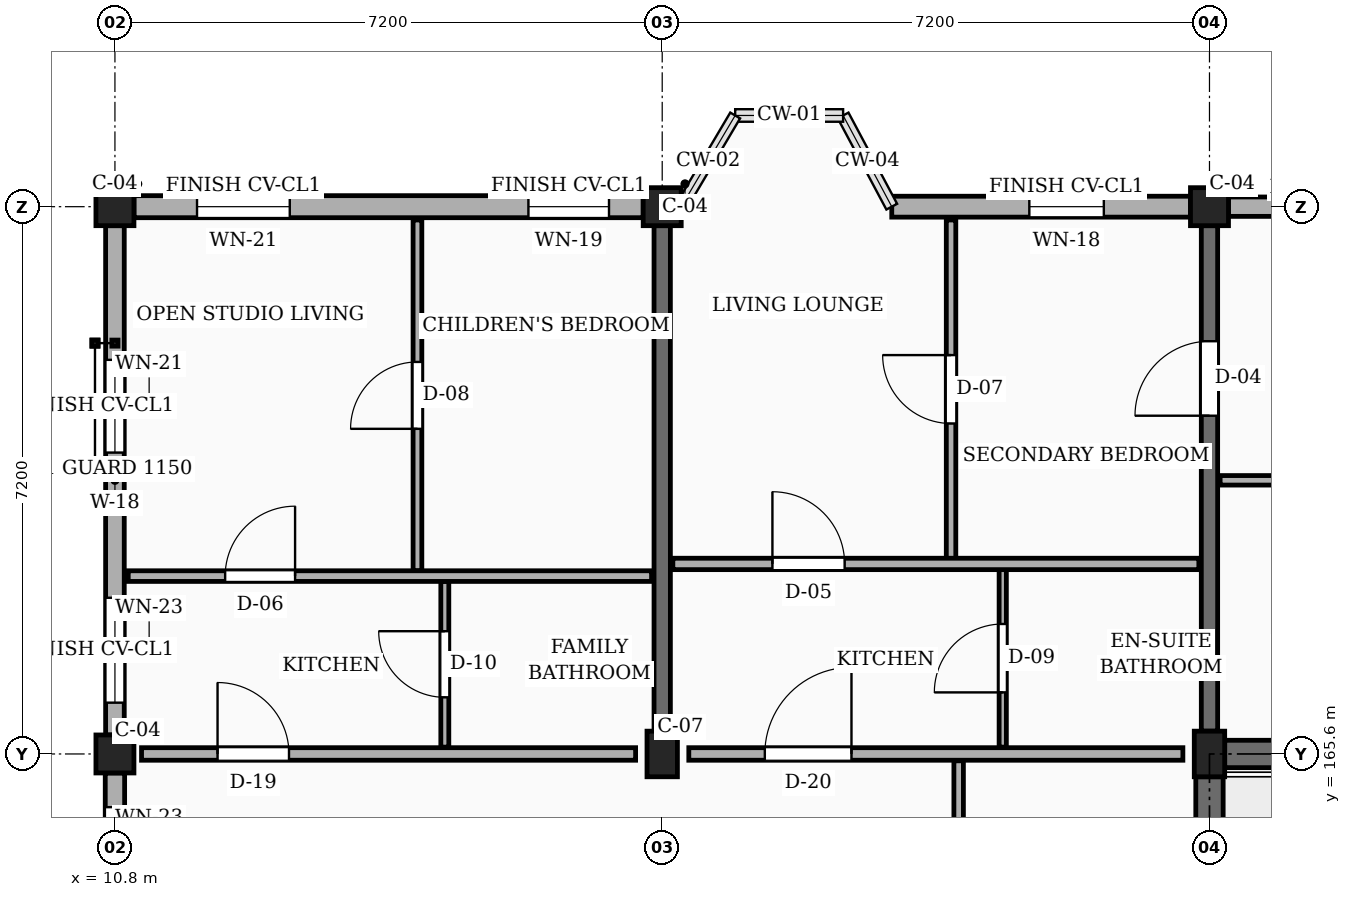
"""IFC4 building model, lengths in metres.
Left out: names, types, materials, properties, quantities, classifications, styles, units other than length and angle.
Written with IfcOpenShell. Run it as: python <this file> out.ifc"""

import sys

from ifc_helpers import new_model, si_unit, direction, frame, frame_2d, origin, origin_2d, place, context, subcontext, project, spatial, rectangle, extrude, element, fill, save


model = new_model("IFC4")
c1 = context("Model", 3, precision=1e-05, world=origin(), true_north=direction((0.0, 1.0)))
c2 = subcontext(c1, "Body", "Model", "MODEL_VIEW")
j1 = project(units=[si_unit("LENGTHUNIT", "METRE"), si_unit("PLANEANGLEUNIT", "RADIAN")], contexts=[c1])
p1 = place(None, origin())
s1 = spatial("IfcSite", under=j1, at=p1, CompositionType="ELEMENT")
p2 = place(p1, origin())
s2 = spatial("IfcBuilding", under=s1, at=p2, CompositionType="ELEMENT")
p3 = place(p2, frame((0.0, 0.0, 32.85)))
s3 = spatial("IfcBuildingStorey", under=s2, at=p3, CompositionType="ELEMENT", Elevation=32.85)
for number, where, z_axis, x_axis in (
    (1, (10.8, 165.6, 0.0), (0.0, 0.0, 1.0), (1.0, 0.0, 0.0)),
    (2, (10.8, 172.8, 0.0), (0.0, 0.0, 1.0), (1.0, 0.0, 0.0)),
):
    element("IfcColumn", number, at=place(p3, frame(where, z_axis=z_axis, x_axis=x_axis)), inside=s3, PredefinedType="COLUMN", context=c2, shape_type="SweptSolid", body=[
        extrude(rectangle(XDim=0.5, YDim=0.5, at=origin_2d()), origin(), (0.0, 0.0, 1.0), 3.15),
    ])
p4 = place(p3, frame((18.0, 165.6, 0.0), z_axis=(0.0, 0.0, 1.0), x_axis=(1.0, 0.0, 0.0)))
e3 = element("IfcColumn", 3, at=p4, inside=s3, PredefinedType="COLUMN", context=c2, shape_type="SweptSolid", body=[
    extrude(rectangle(XDim=0.4, YDim=0.6, at=origin_2d()), origin(), (0.0, 0.0, 1.0), 3.15),
])
p5 = place(p3, frame((18.0, 172.8, 0.0), z_axis=(0.0, 0.0, 1.0), x_axis=(1.0, 0.0, 0.0)))
e4 = element("IfcColumn", 4, at=p5, inside=s3, PredefinedType="COLUMN", context=c2, shape_type="SweptSolid", body=[
    extrude(rectangle(XDim=0.5, YDim=0.5, at=origin_2d()), origin(), (0.0, 0.0, 1.0), 3.15),
])
p6 = place(p3, frame((25.2, 165.6, 0.0), z_axis=(0.0, 0.0, 1.0), x_axis=(1.0, 0.0, 0.0)))
e5 = element("IfcColumn", 5, at=p6, inside=s3, PredefinedType="COLUMN", context=c2, shape_type="SweptSolid", body=[
    extrude(rectangle(XDim=0.4, YDim=0.6, at=origin_2d()), origin(), (0.0, 0.0, 1.0), 3.15),
])
p7 = place(p3, frame((25.2, 172.8, 0.0), z_axis=(0.0, 0.0, 1.0), x_axis=(1.0, 0.0, 0.0)))
e6 = element("IfcColumn", 6, at=p7, inside=s3, PredefinedType="COLUMN", context=c2, shape_type="SweptSolid", body=[
    extrude(rectangle(XDim=0.5, YDim=0.5, at=origin_2d()), origin(), (0.0, 0.0, 1.0), 3.15),
])
p8 = place(p3, frame((18.0, 165.9, 0.0), z_axis=(0.0, 0.0, 1.0), x_axis=(0.0, 1.0, 0.0)))
e7 = element("IfcWall", 7, at=p8, inside=s3, PredefinedType="SOLIDWALL", context=c2, shape_type="SweptSolid", body=[
    extrude(rectangle(XDim=6.65, YDim=0.215, at=frame_2d((3.325, 0.0))), origin(), (0.0, 0.0, 1.0), 2.185),
])
p9 = place(p3, frame((25.2, 165.9, 0.0), z_axis=(0.0, 0.0, 1.0), x_axis=(0.0, 1.0, 0.0)))
e8 = element("IfcWall", 8, at=p9, inside=s3, PredefinedType="SOLIDWALL", context=c2, shape_type="SweptSolid", body=[
    extrude(rectangle(XDim=6.65, YDim=0.215, at=frame_2d((3.325, 0.0))), origin(), (0.0, 0.0, 1.0), 2.185),
])
p10 = place(p9, frame((4.15, 0.0, 0.0)))
e9 = element("IfcOpeningElement", 9, at=p10, cuts=e8, PredefinedType="OPENING", context=c2, shape_type="SweptSolid", body=[
    extrude(rectangle(XDim=0.98, YDim=2.12, at=frame_2d((0.49, 1.06))), frame((0.0, 0.118, 0.0), z_axis=(0.0, -1.0, 0.0), x_axis=(1.0, 0.0, 0.0)), (0.0, 0.0, 1.0), 0.235),
])
p11 = place(p3, frame((32.15, 172.8, 0.0), z_axis=(0.0, 0.0, 1.0), x_axis=(-1.0, 0.0, 0.0)))
e10 = element("IfcWall", 10, at=p11, inside=s3, PredefinedType="SOLIDWALL", context=c2, shape_type="SweptSolid", body=[
    extrude(rectangle(XDim=6.7, YDim=0.255, at=frame_2d((3.35, 0.0))), origin(), (0.0, 0.0, 1.0), 2.455),
])
p12 = place(p11, frame((0.45, 0.0, 0.78)))
e11 = element("IfcOpeningElement", 11, at=p12, cuts=e10, PredefinedType="OPENING", context=c2, shape_type="SweptSolid", body=[
    extrude(rectangle(XDim=1.44, YDim=1.26, at=frame_2d((0.72, 0.63))), frame((0.0, 0.137, 0.0), z_axis=(0.0, -1.0, 0.0), x_axis=(1.0, 0.0, 0.0)), (0.0, 0.0, 1.0), 0.275),
])
p13 = place(p11, frame((4.65, 0.0, 0.78)))
e12 = element("IfcOpeningElement", 12, at=p13, cuts=e10, PredefinedType="OPENING", context=c2, shape_type="SweptSolid", body=[
    extrude(rectangle(XDim=0.98, YDim=1.36, at=frame_2d((0.49, 0.68))), frame((0.0, 0.137, 0.0), z_axis=(0.0, -1.0, 0.0), x_axis=(1.0, 0.0, 0.0)), (0.0, 0.0, 1.0), 0.275),
])
p14 = place(p3, frame((24.95, 172.8, 0.0), z_axis=(0.0, 0.0, 1.0), x_axis=(-1.0, 0.0, 0.0)))
e13 = element("IfcWall", 13, at=p14, inside=s3, PredefinedType="SOLIDWALL", context=c2, shape_type="SweptSolid", body=[
    extrude(rectangle(XDim=3.93, YDim=0.275, at=frame_2d((1.965, 0.0))), origin(), (0.0, 0.0, 1.0), 2.455),
])
p15 = place(p14, frame((1.14, 0.0, 0.78)))
e14 = element("IfcOpeningElement", 14, at=p15, cuts=e13, PredefinedType="OPENING", context=c2, shape_type="SweptSolid", body=[
    extrude(rectangle(XDim=0.98, YDim=1.36, at=frame_2d((0.49, 0.68))), frame((0.0, 0.147, 0.0), z_axis=(0.0, -1.0, 0.0), x_axis=(1.0, 0.0, 0.0)), (0.0, 0.0, 1.0), 0.295),
])
p16 = place(p3, frame((17.75, 172.8, 0.0), z_axis=(0.0, 0.0, 1.0), x_axis=(-1.0, 0.0, 0.0)))
e15 = element("IfcWall", 15, at=p16, inside=s3, PredefinedType="SOLIDWALL", context=c2, shape_type="SweptSolid", body=[
    extrude(rectangle(XDim=6.7, YDim=0.29, at=frame_2d((3.35, 0.0))), origin(), (0.0, 0.0, 1.0), 2.455),
])
p17 = place(p16, frame((0.45, 0.0, 0.78)))
e16 = element("IfcOpeningElement", 16, at=p17, cuts=e15, PredefinedType="OPENING", context=c2, shape_type="SweptSolid", body=[
    extrude(rectangle(XDim=1.06, YDim=1.36, at=frame_2d((0.53, 0.68))), frame((0.0, 0.155, 0.0), z_axis=(0.0, -1.0, 0.0), x_axis=(1.0, 0.0, 0.0)), (0.0, 0.0, 1.0), 0.31),
])
p18 = place(p16, frame((4.65, 0.0, 0.78)))
e17 = element("IfcOpeningElement", 17, at=p18, cuts=e15, PredefinedType="OPENING", context=c2, shape_type="SweptSolid", body=[
    extrude(rectangle(XDim=1.22, YDim=1.36, at=frame_2d((0.61, 0.68))), frame((0.0, 0.155, 0.0), z_axis=(0.0, -1.0, 0.0), x_axis=(1.0, 0.0, 0.0)), (0.0, 0.0, 1.0), 0.31),
])
p19 = place(p3, frame((10.8, 172.55, 0.0), z_axis=(0.0, 0.0, 1.0), x_axis=(0.0, -1.0, 0.0)))
e18 = element("IfcWall", 18, at=p19, inside=s3, PredefinedType="SOLIDWALL", context=c2, shape_type="SweptSolid", body=[
    extrude(rectangle(XDim=6.7, YDim=0.245, at=frame_2d((3.35, 0.0))), origin(), (0.0, 0.0, 1.0), 2.455),
])
p20 = place(p19, frame((1.765, 0.0, 0.78)))
e19 = element("IfcOpeningElement", 19, at=p20, cuts=e18, PredefinedType="OPENING", context=c2, shape_type="SweptSolid", body=[
    extrude(rectangle(XDim=1.22, YDim=1.36, at=frame_2d((0.61, 0.68))), frame((0.0, 0.133, 0.0), z_axis=(0.0, -1.0, 0.0), x_axis=(1.0, 0.0, 0.0)), (0.0, 0.0, 1.0), 0.265),
])
p21 = place(p19, frame((4.895, 0.0, 0.78)))
e20 = element("IfcOpeningElement", 20, at=p21, cuts=e18, PredefinedType="OPENING", context=c2, shape_type="SweptSolid", body=[
    extrude(rectangle(XDim=1.38, YDim=1.36, at=frame_2d((0.69, 0.68))), frame((0.0, 0.133, 0.0), z_axis=(0.0, -1.0, 0.0), x_axis=(1.0, 0.0, 0.0)), (0.0, 0.0, 1.0), 0.265),
])
p22 = place(p3, frame((10.8, 165.35, 0.0), z_axis=(0.0, 0.0, 1.0), x_axis=(0.0, -1.0, 0.0)))
e21 = element("IfcWall", 21, at=p22, inside=s3, PredefinedType="SOLIDWALL", context=c2, shape_type="SweptSolid", body=[
    extrude(rectangle(XDim=6.7, YDim=0.255, at=frame_2d((3.35, 0.0))), origin(), (0.0, 0.0, 1.0), 2.455),
])
p23 = place(p22, frame((0.45, 0.0, 0.78)))
e22 = element("IfcOpeningElement", 22, at=p23, cuts=e21, PredefinedType="OPENING", context=c2, shape_type="SweptSolid", body=[
    extrude(rectangle(XDim=1.38, YDim=1.36, at=frame_2d((0.69, 0.68))), frame((0.0, 0.137, 0.0), z_axis=(0.0, -1.0, 0.0), x_axis=(1.0, 0.0, 0.0)), (0.0, 0.0, 1.0), 0.275),
])
p24 = place(p22, frame((4.65, 0.0, 0.78)))
e23 = element("IfcOpeningElement", 23, at=p24, cuts=e21, PredefinedType="OPENING", context=c2, shape_type="SweptSolid", body=[
    extrude(rectangle(XDim=0.94, YDim=1.44, at=frame_2d((0.47, 0.72))), frame((0.0, 0.137, 0.0), z_axis=(0.0, -1.0, 0.0), x_axis=(1.0, 0.0, 0.0)), (0.0, 0.0, 1.0), 0.275),
])
p25 = place(p3, frame((25.2, 158.7, 0.0), z_axis=(0.0, 0.0, 1.0), x_axis=(0.0, 1.0, 0.0)))
e24 = element("IfcWall", 24, at=p25, inside=s3, PredefinedType="SHEAR", context=c2, shape_type="SweptSolid", body=[
    extrude(rectangle(XDim=6.6, YDim=0.36, at=frame_2d((3.3, 0.0))), origin(), (0.0, 0.0, 1.0), 2.885),
])
p26 = place(p3, frame((25.4, 165.6, 0.0), z_axis=(0.0, 0.0, 1.0), x_axis=(1.0, 0.0, 0.0)))
e25 = element("IfcWall", 25, at=p26, inside=s3, PredefinedType="SHEAR", context=c2, shape_type="SweptSolid", body=[
    extrude(rectangle(XDim=6.8, YDim=0.36, at=frame_2d((3.4, 0.0))), origin(), (0.0, 0.0, 1.0), 2.885),
])
p27 = place(p3, frame((11.15, 165.6, 0.0), z_axis=(0.0, 0.0, 1.0), x_axis=(1.0, 0.0, 0.0)))
e26 = element("IfcWall", 26, at=p27, inside=s3, PredefinedType="PARTITIONING", context=c2, shape_type="SweptSolid", body=[
    extrude(rectangle(XDim=6.5, YDim=0.165, at=frame_2d((3.25, 0.0))), origin(), (0.0, 0.0, 1.0), 2.32),
])
p28 = place(p27, frame((1.0, 0.0, 0.0)))
e27 = element("IfcOpeningElement", 27, at=p28, cuts=e26, PredefinedType="OPENING", context=c2, shape_type="SweptSolid", body=[
    extrude(rectangle(XDim=0.94, YDim=2.12, at=frame_2d((0.47, 1.06))), frame((0.0, 0.093, 0.0), z_axis=(0.0, -1.0, 0.0), x_axis=(1.0, 0.0, 0.0)), (0.0, 0.0, 1.0), 0.185),
])
p29 = place(p3, frame((18.35, 165.6, 0.0), z_axis=(0.0, 0.0, 1.0), x_axis=(1.0, 0.0, 0.0)))
e28 = element("IfcWall", 28, at=p29, inside=s3, PredefinedType="PARTITIONING", context=c2, shape_type="SweptSolid", body=[
    extrude(rectangle(XDim=6.5, YDim=0.165, at=frame_2d((3.25, 0.0))), origin(), (0.0, 0.0, 1.0), 2.32),
])
p30 = place(p29, frame((1.0, 0.0, 0.0)))
e29 = element("IfcOpeningElement", 29, at=p30, cuts=e28, PredefinedType="OPENING", context=c2, shape_type="SweptSolid", body=[
    extrude(rectangle(XDim=1.14, YDim=2.18, at=frame_2d((0.57, 1.09))), frame((0.0, 0.093, 0.0), z_axis=(0.0, -1.0, 0.0), x_axis=(1.0, 0.0, 0.0)), (0.0, 0.0, 1.0), 0.185),
])
p31 = place(p3, frame((14.78, 168.01, 0.0), z_axis=(0.0, 0.0, 1.0), x_axis=(0.0, 1.0, 0.0)))
e30 = element("IfcWall", 30, at=p31, inside=s3, PredefinedType="PARTITIONING", context=c2, shape_type="SweptSolid", body=[
    extrude(rectangle(XDim=4.615, YDim=0.115, at=frame_2d((2.308, 0.0))), origin(), (0.0, 0.0, 1.0), 2.32),
])
p32 = place(p31, frame((1.867, 0.0, 0.0)))
e31 = element("IfcOpeningElement", 31, at=p32, cuts=e30, PredefinedType="OPENING", context=c2, shape_type="SweptSolid", body=[
    extrude(rectangle(XDim=0.88, YDim=2.08, at=frame_2d((0.44, 1.04))), frame((0.0, 0.067, 0.0), z_axis=(0.0, -1.0, 0.0), x_axis=(1.0, 0.0, 0.0)), (0.0, 0.0, 1.0), 0.135),
])
p33 = place(p3, frame((15.14, 165.69, 0.0), z_axis=(0.0, 0.0, 1.0), x_axis=(0.0, 1.0, 0.0)))
e32 = element("IfcWall", 32, at=p33, inside=s3, PredefinedType="PARTITIONING", context=c2, shape_type="SweptSolid", body=[
    extrude(rectangle(XDim=2.18, YDim=0.105, at=frame_2d((1.09, 0.0))), origin(), (0.0, 0.0, 1.0), 2.32),
])
p34 = place(p33, frame((0.655, 0.0, 0.0)))
e33 = element("IfcOpeningElement", 33, at=p34, cuts=e32, PredefinedType="OPENING", context=c2, shape_type="SweptSolid", body=[
    extrude(rectangle(XDim=0.87, YDim=2.05, at=frame_2d((0.435, 1.025))), frame((0.0, 0.062, 0.0), z_axis=(0.0, -1.0, 0.0), x_axis=(1.0, 0.0, 0.0)), (0.0, 0.0, 1.0), 0.125),
])
p35 = place(p3, frame((10.975, 167.94, 0.0), z_axis=(0.0, 0.0, 1.0), x_axis=(1.0, 0.0, 0.0)))
e34 = element("IfcWall", 34, at=p35, inside=s3, PredefinedType="PARTITIONING", context=c2, shape_type="SweptSolid", body=[
    extrude(rectangle(XDim=6.885, YDim=0.14, at=frame_2d((3.442, 0.0))), origin(), (0.0, 0.0, 1.0), 2.32),
])
p36 = place(p35, frame((1.275, 0.0, 0.0)))
e35 = element("IfcOpeningElement", 35, at=p36, cuts=e34, PredefinedType="OPENING", context=c2, shape_type="SweptSolid", body=[
    extrude(rectangle(XDim=0.92, YDim=2.1, at=frame_2d((0.46, 1.05))), frame((0.0, 0.08, 0.0), z_axis=(0.0, -1.0, 0.0), x_axis=(1.0, 0.0, 0.0)), (0.0, 0.0, 1.0), 0.16),
])
p37 = place(p3, frame((21.9, 158.49, 0.0), z_axis=(0.0, 0.0, 1.0), x_axis=(0.0, 1.0, 0.0)))
e36 = element("IfcWall", 36, at=p37, inside=s3, PredefinedType="PARTITIONING", context=c2, shape_type="SweptSolid", body=[
    extrude(rectangle(XDim=7.02, YDim=0.125, at=frame_2d((3.51, 0.0))), origin(), (0.0, 0.0, 1.0), 2.32),
])
p38 = place(p37, frame((2.85, 0.0, 0.0)))
e37 = element("IfcOpeningElement", 37, at=p38, cuts=e36, PredefinedType="OPENING", context=c2, shape_type="SweptSolid", body=[
    extrude(rectangle(XDim=1.02, YDim=2.15, at=frame_2d((0.51, 1.075))), frame((0.0, 0.073, 0.0), z_axis=(0.0, -1.0, 0.0), x_axis=(1.0, 0.0, 0.0)), (0.0, 0.0, 1.0), 0.145),
])
p39 = place(p3, frame((21.8, 168.17, 0.0), z_axis=(0.0, 0.0, 1.0), x_axis=(0.0, 1.0, 0.0)))
e38 = element("IfcWall", 38, at=p39, inside=s3, PredefinedType="PARTITIONING", context=c2, shape_type="SweptSolid", body=[
    extrude(rectangle(XDim=4.455, YDim=0.125, at=frame_2d((2.228, 0.0))), origin(), (0.0, 0.0, 1.0), 2.32),
])
p40 = place(p39, frame((1.778, 0.0, 0.0)))
e39 = element("IfcOpeningElement", 39, at=p40, cuts=e38, PredefinedType="OPENING", context=c2, shape_type="SweptSolid", body=[
    extrude(rectangle(XDim=0.9, YDim=2.1, at=frame_2d((0.45, 1.05))), frame((0.0, 0.073, 0.0), z_axis=(0.0, -1.0, 0.0), x_axis=(1.0, 0.0, 0.0)), (0.0, 0.0, 1.0), 0.145),
])
p41 = place(p3, frame((22.48, 165.69, 0.0), z_axis=(0.0, 0.0, 1.0), x_axis=(0.0, 1.0, 0.0)))
e40 = element("IfcWall", 40, at=p41, inside=s3, PredefinedType="PARTITIONING", context=c2, shape_type="SweptSolid", body=[
    extrude(rectangle(XDim=2.34, YDim=0.095, at=frame_2d((1.17, 0.0))), origin(), (0.0, 0.0, 1.0), 2.32),
])
p42 = place(p41, frame((0.72, 0.0, 0.0)))
e41 = element("IfcOpeningElement", 41, at=p42, cuts=e40, PredefinedType="OPENING", context=c2, shape_type="SweptSolid", body=[
    extrude(rectangle(XDim=0.9, YDim=2.05, at=frame_2d((0.45, 1.025))), frame((0.0, 0.058, 0.0), z_axis=(0.0, -1.0, 0.0), x_axis=(1.0, 0.0, 0.0)), (0.0, 0.0, 1.0), 0.115),
])
p43 = place(p3, frame((18.14, 168.1, 0.0), z_axis=(0.0, 0.0, 1.0), x_axis=(1.0, 0.0, 0.0)))
e42 = element("IfcWall", 42, at=p43, inside=s3, PredefinedType="PARTITIONING", context=c2, shape_type="SweptSolid", body=[
    extrude(rectangle(XDim=6.92, YDim=0.15, at=frame_2d((3.46, 0.0))), origin(), (0.0, 0.0, 1.0), 2.32),
])
p44 = place(p43, frame((1.31, 0.0, 0.0)))
e43 = element("IfcOpeningElement", 43, at=p44, cuts=e42, PredefinedType="OPENING", context=c2, shape_type="SweptSolid", body=[
    extrude(rectangle(XDim=0.95, YDim=2.1, at=frame_2d((0.475, 1.05))), frame((0.0, 0.085, 0.0), z_axis=(0.0, -1.0, 0.0), x_axis=(1.0, 0.0, 0.0)), (0.0, 0.0, 1.0), 0.17),
])
p45 = place(p3, frame((25.34, 169.2, 0.0), z_axis=(0.0, 0.0, 1.0), x_axis=(1.0, 0.0, 0.0)))
e44 = element("IfcWall", 44, at=p45, inside=s3, PredefinedType="PARTITIONING", context=c2, shape_type="SweptSolid", body=[
    extrude(rectangle(XDim=6.92, YDim=0.125, at=frame_2d((3.46, 0.0))), origin(), (0.0, 0.0, 1.0), 2.32),
])
p46 = place(p45, frame((1.05, 0.0, 0.0)))
e45 = element("IfcOpeningElement", 45, at=p46, cuts=e44, PredefinedType="OPENING", context=c2, shape_type="SweptSolid", body=[
    extrude(rectangle(XDim=0.87, YDim=2.05, at=frame_2d((0.435, 1.025))), frame((0.0, 0.073, 0.0), z_axis=(0.0, -1.0, 0.0), x_axis=(1.0, 0.0, 0.0)), (0.0, 0.0, 1.0), 0.145),
])
p47 = place(p45, frame((4.45, 0.0, 0.0)))
e46 = element("IfcOpeningElement", 46, at=p47, cuts=e44, PredefinedType="OPENING", context=c2, shape_type="SweptSolid", body=[
    extrude(rectangle(XDim=0.88, YDim=2.08, at=frame_2d((0.44, 1.04))), frame((0.0, 0.073, 0.0), z_axis=(0.0, -1.0, 0.0), x_axis=(1.0, 0.0, 0.0)), (0.0, 0.0, 1.0), 0.145),
])
p48 = place(p15, origin())
e47 = element("IfcWindow", 47, at=p48, inside=s3, PartitioningType="SINGLE_PANEL", PredefinedType="WINDOW", context=c2, shape_type="SweptSolid", body=[
    extrude(rectangle(XDim=0.98, YDim=1.36, at=frame_2d((0.49, 0.68))), frame((0.0, 0.03, 0.0), z_axis=(0.0, -1.0, 0.0), x_axis=(1.0, 0.0, 0.0)), (0.0, 0.0, 1.0), 0.06),
])
fill(e14, e47)
p49 = place(p17, origin())
e48 = element("IfcWindow", 48, at=p49, inside=s3, PartitioningType="SINGLE_PANEL", PredefinedType="WINDOW", context=c2, shape_type="SweptSolid", body=[
    extrude(rectangle(XDim=1.06, YDim=1.36, at=frame_2d((0.53, 0.68))), frame((0.0, 0.03, 0.0), z_axis=(0.0, -1.0, 0.0), x_axis=(1.0, 0.0, 0.0)), (0.0, 0.0, 1.0), 0.06),
])
fill(e16, e48)
p50 = place(p18, origin())
e49 = element("IfcWindow", 49, at=p50, inside=s3, PartitioningType="SINGLE_PANEL", PredefinedType="WINDOW", context=c2, shape_type="SweptSolid", body=[
    extrude(rectangle(XDim=1.22, YDim=1.36, at=frame_2d((0.61, 0.68))), frame((0.0, 0.03, 0.0), z_axis=(0.0, -1.0, 0.0), x_axis=(1.0, 0.0, 0.0)), (0.0, 0.0, 1.0), 0.06),
])
fill(e17, e49)
p51 = place(p20, origin())
e50 = element("IfcWindow", 50, at=p51, inside=s3, PartitioningType="SINGLE_PANEL", PredefinedType="WINDOW", context=c2, shape_type="SweptSolid", body=[
    extrude(rectangle(XDim=1.22, YDim=1.36, at=frame_2d((0.61, 0.68))), frame((0.0, 0.03, 0.0), z_axis=(0.0, -1.0, 0.0), x_axis=(1.0, 0.0, 0.0)), (0.0, 0.0, 1.0), 0.06),
])
fill(e19, e50)
p52 = place(p21, origin())
e51 = element("IfcWindow", 51, at=p52, inside=s3, PartitioningType="SINGLE_PANEL", PredefinedType="WINDOW", context=c2, shape_type="SweptSolid", body=[
    extrude(rectangle(XDim=1.38, YDim=1.36, at=frame_2d((0.69, 0.68))), frame((0.0, 0.03, 0.0), z_axis=(0.0, -1.0, 0.0), x_axis=(1.0, 0.0, 0.0)), (0.0, 0.0, 1.0), 0.06),
])
fill(e20, e51)
p53 = place(p23, origin())
e52 = element("IfcWindow", 52, at=p53, inside=s3, PartitioningType="SINGLE_PANEL", PredefinedType="WINDOW", context=c2, shape_type="SweptSolid", body=[
    extrude(rectangle(XDim=1.38, YDim=1.36, at=frame_2d((0.69, 0.68))), frame((0.0, 0.03, 0.0), z_axis=(0.0, -1.0, 0.0), x_axis=(1.0, 0.0, 0.0)), (0.0, 0.0, 1.0), 0.06),
])
fill(e22, e52)
p54 = place(p28, origin())
e53 = element("IfcDoor", 53, at=p54, inside=s3, OperationType="SINGLE_SWING_LEFT", PredefinedType="DOOR", context=c2, shape_type="SweptSolid", body=[
    extrude(rectangle(XDim=0.94, YDim=2.12, at=frame_2d((0.47, 1.06))), frame((0.0, 0.025, 0.0), z_axis=(0.0, -1.0, 0.0), x_axis=(1.0, 0.0, 0.0)), (0.0, 0.0, 1.0), 0.05),
])
fill(e27, e53)
p55 = place(p30, origin())
e54 = element("IfcDoor", 54, at=p55, inside=s3, OperationType="SINGLE_SWING_RIGHT", PredefinedType="DOOR", context=c2, shape_type="SweptSolid", body=[
    extrude(rectangle(XDim=1.14, YDim=2.18, at=frame_2d((0.57, 1.09))), frame((0.0, 0.025, 0.0), z_axis=(0.0, -1.0, 0.0), x_axis=(1.0, 0.0, 0.0)), (0.0, 0.0, 1.0), 0.05),
])
fill(e29, e54)
p56 = place(p32, origin())
e55 = element("IfcDoor", 55, at=p56, inside=s3, OperationType="SINGLE_SWING_LEFT", PredefinedType="DOOR", context=c2, shape_type="SweptSolid", body=[
    extrude(rectangle(XDim=0.88, YDim=2.08, at=frame_2d((0.44, 1.04))), frame((0.0, 0.025, 0.0), z_axis=(0.0, -1.0, 0.0), x_axis=(1.0, 0.0, 0.0)), (0.0, 0.0, 1.0), 0.05),
])
fill(e31, e55)
p57 = place(p34, origin())
e56 = element("IfcDoor", 56, at=p57, inside=s3, OperationType="SINGLE_SWING_RIGHT", PredefinedType="DOOR", context=c2, shape_type="SweptSolid", body=[
    extrude(rectangle(XDim=0.87, YDim=2.05, at=frame_2d((0.435, 1.025))), frame((0.0, 0.025, 0.0), z_axis=(0.0, -1.0, 0.0), x_axis=(1.0, 0.0, 0.0)), (0.0, 0.0, 1.0), 0.05),
])
fill(e33, e56)
p58 = place(p36, origin())
e57 = element("IfcDoor", 57, at=p58, inside=s3, OperationType="SINGLE_SWING_RIGHT", PredefinedType="DOOR", context=c2, shape_type="SweptSolid", body=[
    extrude(rectangle(XDim=0.92, YDim=2.1, at=frame_2d((0.46, 1.05))), frame((0.0, 0.025, 0.0), z_axis=(0.0, -1.0, 0.0), x_axis=(1.0, 0.0, 0.0)), (0.0, 0.0, 1.0), 0.05),
])
fill(e35, e57)
p59 = place(p40, origin())
e58 = element("IfcDoor", 58, at=p59, inside=s3, OperationType="SINGLE_SWING_RIGHT", PredefinedType="DOOR", context=c2, shape_type="SweptSolid", body=[
    extrude(rectangle(XDim=0.9, YDim=2.1, at=frame_2d((0.45, 1.05))), frame((0.0, 0.025, 0.0), z_axis=(0.0, -1.0, 0.0), x_axis=(1.0, 0.0, 0.0)), (0.0, 0.0, 1.0), 0.05),
])
fill(e39, e58)
p60 = place(p42, origin())
e59 = element("IfcDoor", 59, at=p60, inside=s3, OperationType="SINGLE_SWING_LEFT", PredefinedType="DOOR", context=c2, shape_type="SweptSolid", body=[
    extrude(rectangle(XDim=0.9, YDim=2.05, at=frame_2d((0.45, 1.025))), frame((0.0, 0.025, 0.0), z_axis=(0.0, -1.0, 0.0), x_axis=(1.0, 0.0, 0.0)), (0.0, 0.0, 1.0), 0.05),
])
fill(e41, e59)
p61 = place(p44, origin())
e60 = element("IfcDoor", 60, at=p61, inside=s3, OperationType="SINGLE_SWING_LEFT", PredefinedType="DOOR", context=c2, shape_type="SweptSolid", body=[
    extrude(rectangle(XDim=0.95, YDim=2.1, at=frame_2d((0.475, 1.05))), frame((0.0, 0.025, 0.0), z_axis=(0.0, -1.0, 0.0), x_axis=(1.0, 0.0, 0.0)), (0.0, 0.0, 1.0), 0.05),
])
fill(e43, e60)
p62 = place(p10, origin())
e61 = element("IfcDoor", 61, at=p62, inside=s3, OperationType="SINGLE_SWING_LEFT", PredefinedType="DOOR", context=c2, shape_type="SweptSolid", body=[
    extrude(rectangle(XDim=0.98, YDim=2.12, at=frame_2d((0.49, 1.06))), frame((0.0, 0.025, 0.0), z_axis=(0.0, -1.0, 0.0), x_axis=(1.0, 0.0, 0.0)), (0.0, 0.0, 1.0), 0.05),
])
fill(e9, e61)
save(model, sys.argv[1])
